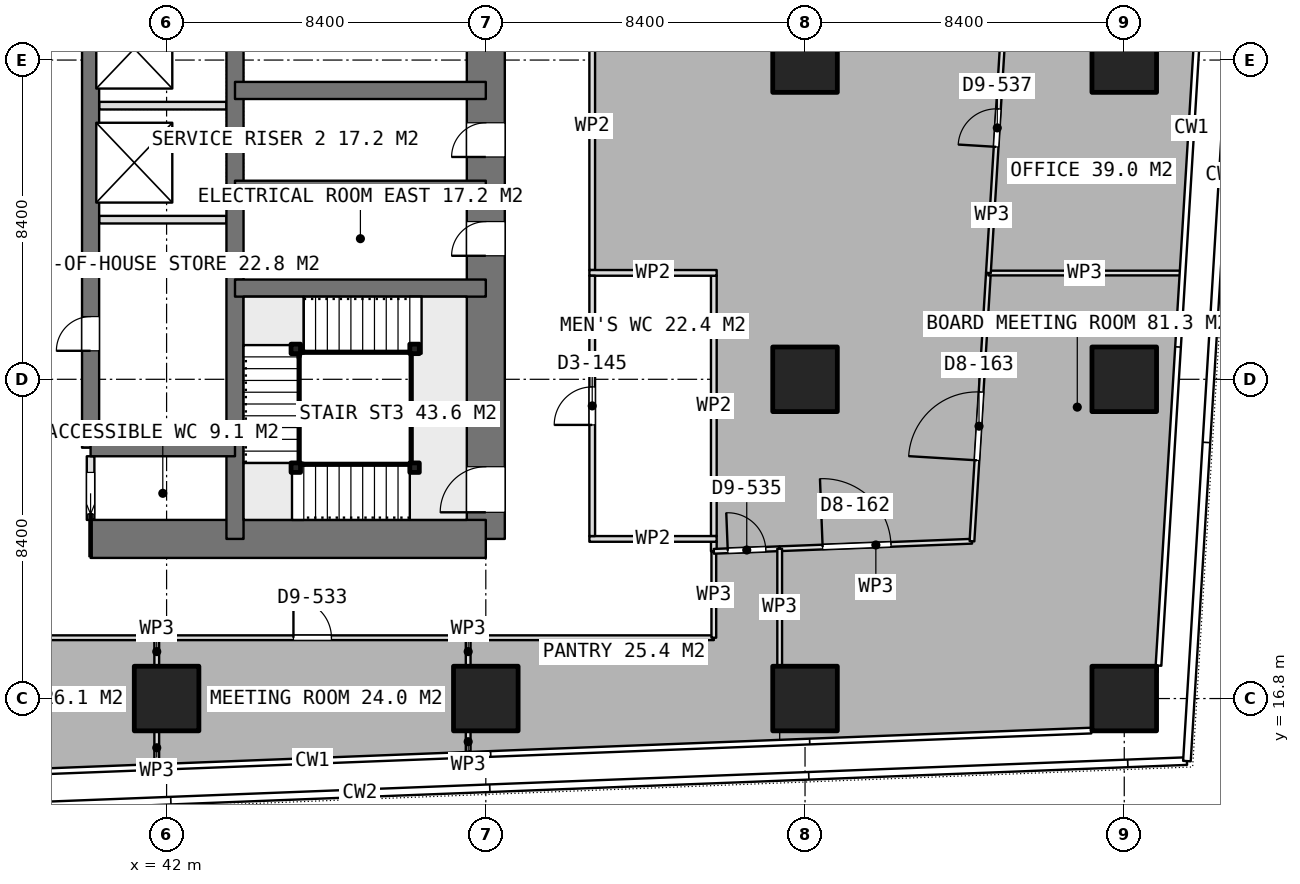
"""IFC4 building model, lengths in metres.
Left out: names, types, materials, properties, quantities, classifications, styles, units other than length and angle.
Written with IfcOpenShell. Run it as: python <this file> out.ifc"""

import sys

from ifc_helpers import new_model, si_unit, direction, frame, frame_2d, origin, origin_2d, place, context, subcontext, project, spatial, rectangle, extrude, element, fill, save


model = new_model("IFC4")
c1 = context("Model", 3, precision=1e-05, world=origin(), true_north=direction((0.0, 1.0)))
c2 = subcontext(c1, "Body", "Model", "MODEL_VIEW")
j1 = project(units=[si_unit("LENGTHUNIT", "METRE"), si_unit("PLANEANGLEUNIT", "RADIAN")], contexts=[c1])
p1 = place(None, origin())
s1 = spatial("IfcSite", under=j1, at=p1, CompositionType="ELEMENT")
p2 = place(p1, origin())
s2 = spatial("IfcBuilding", under=s1, at=p2, CompositionType="ELEMENT")
p3 = place(p2, frame((0.0, 0.0, 136.55)))
s3 = spatial("IfcBuildingStorey", under=s2, at=p3, CompositionType="ELEMENT", Elevation=136.55)
p4 = place(p3, frame((40.0, 21.0, 0.0), z_axis=(0.0, 0.0, 1.0), x_axis=(1.0, 0.0, 0.0)))
e1 = element("IfcWall", 1, at=p4, inside=s3, PredefinedType="SHEAR", context=c2, shape_type="SweptSolid", body=[
    extrude(rectangle(XDim=10.4, YDim=1.0, at=frame_2d((5.2, 0.0))), origin(), (0.0, 0.0, 1.0), 3.75),
])
p5 = place(p3, frame((50.4, 21.0, 0.0), z_axis=(0.0, 0.0, 1.0), x_axis=(0.0, 1.0, 0.0)))
e2 = element("IfcWall", 2, at=p5, inside=s3, PredefinedType="SHEAR", context=c2, shape_type="SweptSolid", body=[
    extrude(rectangle(XDim=25.2, YDim=1.0, at=frame_2d((12.6, 0.0))), origin(), (0.0, 0.0, 1.0), 3.75),
])
p6 = place(p5, frame((16.2, 0.0, 0.0)))
e3 = element("IfcOpeningElement", 3, at=p6, cuts=e2, PredefinedType="OPENING", context=c2, shape_type="SweptSolid", body=[
    extrude(rectangle(XDim=1.2, YDim=2.1, at=frame_2d((0.6, 1.05))), frame((0.0, 0.51, 0.0), z_axis=(0.0, -1.0, 0.0), x_axis=(1.0, 0.0, 0.0)), (0.0, 0.0, 1.0), 1.02),
])
p7 = place(p5, frame((10.05, 0.0, 0.0)))
e4 = element("IfcOpeningElement", 4, at=p7, cuts=e2, PredefinedType="OPENING", context=c2, shape_type="SweptSolid", body=[
    extrude(rectangle(XDim=0.9, YDim=2.1, at=frame_2d((0.45, 1.05))), frame((0.0, 0.51, 0.0), z_axis=(0.0, -1.0, 0.0), x_axis=(1.0, 0.0, 0.0)), (0.0, 0.0, 1.0), 1.02),
])
p8 = place(p5, frame((7.45, 0.0, 0.0)))
e5 = element("IfcOpeningElement", 5, at=p8, cuts=e2, PredefinedType="OPENING", context=c2, shape_type="SweptSolid", body=[
    extrude(rectangle(XDim=0.9, YDim=2.1, at=frame_2d((0.45, 1.05))), frame((0.0, 0.51, 0.0), z_axis=(0.0, -1.0, 0.0), x_axis=(1.0, 0.0, 0.0)), (0.0, 0.0, 1.0), 1.02),
])
p9 = place(p5, frame((0.7, 0.0, 0.0)))
e6 = element("IfcOpeningElement", 6, at=p9, cuts=e2, PredefinedType="OPENING", context=c2, shape_type="SweptSolid", body=[
    extrude(rectangle(XDim=1.2, YDim=2.1, at=frame_2d((0.6, 1.05))), frame((0.0, 0.51, 0.0), z_axis=(0.0, -1.0, 0.0), x_axis=(1.0, 0.0, 0.0)), (0.0, 0.0, 1.0), 1.02),
])
p10 = place(p3, frame((43.8, 21.0, 0.0), z_axis=(0.0, 0.0, 1.0), x_axis=(0.0, 1.0, 0.0)))
e7 = element("IfcWall", 7, at=p10, inside=s3, PredefinedType="SHEAR", context=c2, shape_type="SweptSolid", body=[
    extrude(rectangle(XDim=25.2, YDim=0.45, at=frame_2d((12.6, 0.0))), origin(), (0.0, 0.0, 1.0), 3.75),
])
p11 = place(p3, frame((40.0, 23.4, 0.0), z_axis=(0.0, 0.0, 1.0), x_axis=(0.0, 1.0, 0.0)))
e8 = element("IfcWall", 8, at=p11, inside=s3, PredefinedType="SHEAR", context=c2, shape_type="SweptSolid", body=[
    extrude(rectangle(XDim=18.0, YDim=0.45, at=frame_2d((9.0, 0.0))), origin(), (0.0, 0.0, 1.0), 3.75),
])
p12 = place(p11, frame((2.55, 0.0, 0.0)))
e9 = element("IfcOpeningElement", 9, at=p12, cuts=e8, PredefinedType="OPENING", context=c2, shape_type="SweptSolid", body=[
    extrude(rectangle(XDim=0.9, YDim=2.1, at=frame_2d((0.45, 1.05))), frame((0.0, 0.235, 0.0), z_axis=(0.0, -1.0, 0.0), x_axis=(1.0, 0.0, 0.0)), (0.0, 0.0, 1.0), 0.47),
])
p13 = place(p3, frame((40.0, 23.4, 0.0), z_axis=(0.0, 0.0, 1.0), x_axis=(1.0, 0.0, 0.0)))
e10 = element("IfcWall", 10, at=p13, inside=s3, PredefinedType="SHEAR", context=c2, shape_type="SweptSolid", body=[
    extrude(rectangle(XDim=3.8, YDim=0.45, at=frame_2d((1.9, 0.0))), origin(), (0.0, 0.0, 1.0), 3.75),
])
for number, where, z_axis, x_axis in (
    (11, (43.8, 27.6, 0.0), (0.0, 0.0, 1.0), (1.0, 0.0, 0.0)),
    (12, (43.8, 30.2, 0.0), (0.0, 0.0, 1.0), (1.0, 0.0, 0.0)),
    (13, (43.8, 32.8, 0.0), (0.0, 0.0, 1.0), (1.0, 0.0, 0.0)),
):
    element("IfcWall", number, at=place(p3, frame(where, z_axis=z_axis, x_axis=x_axis)), inside=s3, PredefinedType="SHEAR", context=c2, shape_type="SweptSolid", body=[
        extrude(rectangle(XDim=6.6, YDim=0.45, at=frame_2d((3.3, 0.0))), origin(), (0.0, 0.0, 1.0), 3.75),
    ])
for number, where, z_axis, x_axis in (
    (14, (42.0, 16.8, 0.0), (0.0, 0.0, 1.0), (1.0, 0.0, 0.0)),
    (15, (50.4, 16.8, 0.0), (0.0, 0.0, 1.0), (1.0, 0.0, 0.0)),
    (16, (58.8, 16.8, 0.0), (0.0, 0.0, 1.0), (1.0, 0.0, 0.0)),
    (17, (58.8, 25.2, 0.0), (0.0, 0.0, 1.0), (1.0, 0.0, 0.0)),
    (18, (58.8, 33.6, 0.0), (0.0, 0.0, 1.0), (1.0, 0.0, 0.0)),
    (19, (67.2, 16.8, 0.0), (0.0, 0.0, 1.0), (1.0, 0.0, 0.0)),
    (20, (67.2, 25.2, 0.0), (0.0, 0.0, 1.0), (1.0, 0.0, 0.0)),
    (21, (67.2, 33.6, 0.0), (0.0, 0.0, 1.0), (1.0, 0.0, 0.0)),
):
    element("IfcColumn", number, at=place(p3, frame(where, z_axis=z_axis, x_axis=x_axis)), inside=s3, PredefinedType="COLUMN", context=c2, shape_type="SweptSolid", body=[
        extrude(rectangle(XDim=1.7, YDim=1.7, at=origin_2d()), origin(), (0.0, 0.0, 1.0), 3.75),
    ])
for number, where, z_axis, x_axis in (
    (22, (40.225, 29.4, 0.0), (0.0, 0.0, 1.0), (1.0, 0.0, 0.0)),
    (23, (40.225, 32.4, 0.0), (0.0, 0.0, 1.0), (1.0, 0.0, 0.0)),
):
    element("IfcWall", number, at=place(p3, frame(where, z_axis=z_axis, x_axis=x_axis)), inside=s3, PredefinedType="PARTITIONING", context=c2, shape_type="SweptSolid", body=[
        extrude(rectangle(XDim=3.35, YDim=0.2, at=frame_2d((1.675, 0.0))), origin(), (0.0, 0.0, 1.0), 3.5),
    ])
p14 = place(p3, frame((40.0, 21.5, 0.0), z_axis=(0.0, 0.0, 1.0), x_axis=(0.0, 1.0, 0.0)))
e24 = element("IfcWall", 24, at=p14, inside=s3, PredefinedType="PARTITIONING", context=c2, shape_type="SweptSolid", body=[
    extrude(rectangle(XDim=1.675, YDim=0.2, at=frame_2d((0.837, 0.0))), origin(), (0.0, 0.0, 1.0), 3.5),
])
p15 = place(p14, frame((0.15, 0.0, 0.0)))
e25 = element("IfcOpeningElement", 25, at=p15, cuts=e24, PredefinedType="OPENING", context=c2, shape_type="SweptSolid", body=[
    extrude(rectangle(XDim=1.1, YDim=2.1, at=frame_2d((0.55, 1.05))), frame((0.0, 0.11, 0.0), z_axis=(0.0, -1.0, 0.0), x_axis=(1.0, 0.0, 0.0)), (0.0, 0.0, 1.0), 0.22),
])
for number, where, z_axis, x_axis in (
    (26, (53.125, 21.0, 0.0), (0.0, 0.0, 1.0), (1.0, 0.0, 0.0)),
    (27, (53.125, 28.0, 0.0), (0.0, 0.0, 1.0), (1.0, 0.0, 0.0)),
):
    element("IfcWall", number, at=place(p3, frame(where, z_axis=z_axis, x_axis=x_axis)), inside=s3, PredefinedType="PARTITIONING", context=c2, shape_type="SweptSolid", body=[
        extrude(rectangle(XDim=3.35, YDim=0.15, at=frame_2d((1.675, 0.0))), origin(), (0.0, 0.0, 1.0), 3.5),
    ])
p16 = place(p3, frame((53.2, 21.075, 0.0), z_axis=(0.0, 0.0, 1.0), x_axis=(0.0, 1.0, 0.0)))
e28 = element("IfcWall", 28, at=p16, inside=s3, PredefinedType="PARTITIONING", context=c2, shape_type="SweptSolid", body=[
    extrude(rectangle(XDim=6.85, YDim=0.15, at=frame_2d((3.425, 0.0))), origin(), (0.0, 0.0, 1.0), 3.5),
])
p17 = place(p16, frame((2.925, 0.0, 0.0)))
e29 = element("IfcOpeningElement", 29, at=p17, cuts=e28, PredefinedType="OPENING", context=c2, shape_type="SweptSolid", body=[
    extrude(rectangle(XDim=1.0, YDim=2.1, at=frame_2d((0.5, 1.05))), frame((0.0, 0.085, 0.0), z_axis=(0.0, -1.0, 0.0), x_axis=(1.0, 0.0, 0.0)), (0.0, 0.0, 1.0), 0.17),
])
p18 = place(p3, frame((56.4, 21.075, 0.0), z_axis=(0.0, 0.0, 1.0), x_axis=(0.0, 1.0, 0.0)))
e30 = element("IfcWall", 30, at=p18, inside=s3, PredefinedType="PARTITIONING", context=c2, shape_type="SweptSolid", body=[
    extrude(rectangle(XDim=6.85, YDim=0.15, at=frame_2d((3.425, 0.0))), origin(), (0.0, 0.0, 1.0), 3.5),
])
p19 = place(p3, frame((41.741, 18.4, 0.0), z_axis=(0.0, 0.0, 1.0), x_axis=(1.0, 0.0, 0.0)))
e31 = element("IfcWall", 31, at=p19, inside=s3, PredefinedType="PARTITIONING", context=c2, shape_type="SweptSolid", body=[
    extrude(rectangle(XDim=8.195, YDim=0.125, at=frame_2d((4.098, 0.0))), origin(), (0.0, 0.0, 1.0), 3.5),
])
p20 = place(p19, frame((3.597, 0.0, 0.0)))
e32 = element("IfcOpeningElement", 32, at=p20, cuts=e31, PredefinedType="OPENING", context=c2, shape_type="SweptSolid", body=[
    extrude(rectangle(XDim=1.0, YDim=2.1, at=frame_2d((0.5, 1.05))), frame((0.0, 0.073, 0.0), z_axis=(0.0, -1.0, 0.0), x_axis=(1.0, 0.0, 0.0)), (0.0, 0.0, 1.0), 0.145),
])
p21 = place(p3, frame((49.936, 18.4, 0.0), z_axis=(0.0, 0.0, 1.0), x_axis=(0.0, -1.0, 0.0)))
e33 = element("IfcWall", 33, at=p21, inside=s3, PredefinedType="PARTITIONING", context=c2, shape_type="SweptSolid", body=[
    extrude(rectangle(XDim=0.73, YDim=0.125, at=frame_2d((0.365, 0.0))), origin(), (0.0, 0.0, 1.0), 3.5),
])
p22 = place(p3, frame((49.936, 15.93, 0.0), z_axis=(0.0, 0.0, 1.0), x_axis=(0.0, -1.0, 0.0)))
e34 = element("IfcWall", 34, at=p22, inside=s3, PredefinedType="PARTITIONING", context=c2, shape_type="SweptSolid", body=[
    extrude(rectangle(XDim=0.531, YDim=0.125, at=frame_2d((0.266, 0.0))), origin(), (0.0, 0.0, 1.0), 3.5),
])
p23 = place(p3, frame((41.741, 15.08, 0.0), z_axis=(0.0, 0.0, 1.0), x_axis=(0.0, 1.0, 0.0)))
e35 = element("IfcWall", 35, at=p23, inside=s3, PredefinedType="PARTITIONING", context=c2, shape_type="SweptSolid", body=[
    extrude(rectangle(XDim=0.85, YDim=0.125, at=frame_2d((0.425, 0.0))), origin(), (0.0, 0.0, 1.0), 3.5),
])
p24 = place(p3, frame((41.741, 17.67, 0.0), z_axis=(0.0, 0.0, 1.0), x_axis=(0.0, 1.0, 0.0)))
e36 = element("IfcWall", 36, at=p24, inside=s3, PredefinedType="PARTITIONING", context=c2, shape_type="SweptSolid", body=[
    extrude(rectangle(XDim=0.73, YDim=0.125, at=frame_2d((0.365, 0.0))), origin(), (0.0, 0.0, 1.0), 3.5),
])
p25 = place(p3, frame((49.937, 18.4, 0.0), z_axis=(0.0, 0.0, 1.0), x_axis=(1.0, 0.0, 0.0)))
e37 = element("IfcWall", 37, at=p25, inside=s3, PredefinedType="PARTITIONING", context=c2, shape_type="SweptSolid", body=[
    extrude(rectangle(XDim=6.463, YDim=0.125, at=frame_2d((3.231, 0.0))), origin(), (0.0, 0.0, 1.0), 3.5),
])
p26 = place(p3, frame((56.4, 18.4, 0.0), z_axis=(0.0, 0.0, 1.0), x_axis=(0.0, 1.0, 0.0)))
e38 = element("IfcWall", 38, at=p26, inside=s3, PredefinedType="PARTITIONING", context=c2, shape_type="SweptSolid", body=[
    extrude(rectangle(XDim=2.274, YDim=0.125, at=frame_2d((1.137, 0.0))), origin(), (0.0, 0.0, 1.0), 3.5),
])
p27 = place(p3, frame((56.4, 20.674, 0.0), z_axis=(0.0, 0.0, 1.0), x_axis=(0.999234110548, 0.039130452561, 0.0)))
e39 = element("IfcWall", 39, at=p27, inside=s3, PredefinedType="PARTITIONING", context=c2, shape_type="SweptSolid", body=[
    extrude(rectangle(XDim=1.734, YDim=0.125, at=frame_2d((0.867, 0.0))), origin(), (0.0, 0.0, 1.0), 3.5),
])
p28 = place(p27, frame((0.367, 0.0, 0.0)))
e40 = element("IfcOpeningElement", 40, at=p28, cuts=e39, PredefinedType="OPENING", context=c2, shape_type="SweptSolid", body=[
    extrude(rectangle(XDim=1.0, YDim=2.1, at=frame_2d((0.5, 1.05))), frame((0.0, 0.073, 0.0), z_axis=(0.0, -1.0, 0.0), x_axis=(1.0, 0.0, 0.0)), (0.0, 0.0, 1.0), 0.145),
])
p29 = place(p3, frame((58.133, 20.742, 0.0), z_axis=(0.0, 0.0, 1.0), x_axis=(0.0, -1.0, 0.0)))
e41 = element("IfcWall", 41, at=p29, inside=s3, PredefinedType="PARTITIONING", context=c2, shape_type="SweptSolid", body=[
    extrude(rectangle(XDim=3.072, YDim=0.125, at=frame_2d((1.536, 0.0))), origin(), (0.0, 0.0, 1.0), 3.5),
])
p30 = place(p3, frame((58.134, 20.742, 0.0), z_axis=(0.0, 0.0, 1.0), x_axis=(0.999242539351, 0.038914618727, 0.0)))
e42 = element("IfcWall", 42, at=p30, inside=s3, PredefinedType="PARTITIONING", context=c2, shape_type="SweptSolid", body=[
    extrude(rectangle(XDim=5.063, YDim=0.125, at=frame_2d((2.531, 0.0))), origin(), (0.0, 0.0, 1.0), 3.5),
])
p31 = place(p30, frame((1.13, 0.0, 0.0)))
e43 = element("IfcOpeningElement", 43, at=p31, cuts=e42, PredefinedType="OPENING", context=c2, shape_type="SweptSolid", body=[
    extrude(rectangle(XDim=1.8, YDim=2.1, at=frame_2d((0.9, 1.05))), frame((0.0, 0.073, 0.0), z_axis=(0.0, -1.0, 0.0), x_axis=(1.0, 0.0, 0.0)), (0.0, 0.0, 1.0), 0.145),
])
p32 = place(p3, frame((63.193, 20.939, 0.0), z_axis=(0.0, 0.0, 1.0), x_axis=(0.061084086736, 0.998132623627, 0.0)))
e44 = element("IfcWall", 44, at=p32, inside=s3, PredefinedType="PARTITIONING", context=c2, shape_type="SweptSolid", body=[
    extrude(rectangle(XDim=7.07, YDim=0.125, at=frame_2d((3.535, 0.0))), origin(), (0.0, 0.0, 1.0), 3.5),
])
p33 = place(p32, frame((2.133, 0.0, 0.0)))
e45 = element("IfcOpeningElement", 45, at=p33, cuts=e44, PredefinedType="OPENING", context=c2, shape_type="SweptSolid", body=[
    extrude(rectangle(XDim=1.8, YDim=2.1, at=frame_2d((0.9, 1.05))), frame((0.0, 0.073, 0.0), z_axis=(0.0, -1.0, 0.0), x_axis=(1.0, 0.0, 0.0)), (0.0, 0.0, 1.0), 0.145),
])
p34 = place(p3, frame((63.625, 27.996, 0.0), z_axis=(0.0, 0.0, 1.0), x_axis=(1.0, 0.0, 0.0)))
e46 = element("IfcWall", 46, at=p34, inside=s3, PredefinedType="PARTITIONING", context=c2, shape_type="SweptSolid", body=[
    extrude(rectangle(XDim=5.059, YDim=0.125, at=frame_2d((2.53, 0.0))), origin(), (0.0, 0.0, 1.0), 3.5),
])
p35 = place(p3, frame((63.625, 27.997, 0.0), z_axis=(0.0, 0.0, 1.0), x_axis=(0.061176245149, 0.998126979412, 0.0)))
e47 = element("IfcWall", 47, at=p35, inside=s3, PredefinedType="PARTITIONING", context=c2, shape_type="SweptSolid", body=[
    extrude(rectangle(XDim=7.65, YDim=0.125, at=frame_2d((3.825, 0.0))), origin(), (0.0, 0.0, 1.0), 3.5),
])
p36 = place(p35, frame((3.325, 0.0, 0.0)))
e48 = element("IfcOpeningElement", 48, at=p36, cuts=e47, PredefinedType="OPENING", context=c2, shape_type="SweptSolid", body=[
    extrude(rectangle(XDim=1.0, YDim=2.1, at=frame_2d((0.5, 1.05))), frame((0.0, 0.073, 0.0), z_axis=(0.0, -1.0, 0.0), x_axis=(1.0, 0.0, 0.0)), (0.0, 0.0, 1.0), 0.145),
])
p37 = place(p3, frame((33.826, 18.4, 0.0), z_axis=(0.0, 0.0, 1.0), x_axis=(1.0, 0.0, 0.0)))
e49 = element("IfcWall", 49, at=p37, inside=s3, PredefinedType="PARTITIONING", context=c2, shape_type="SweptSolid", body=[
    extrude(rectangle(XDim=7.914, YDim=0.125, at=frame_2d((3.957, 0.0))), origin(), (0.0, 0.0, 1.0), 3.5),
])
p38 = place(p37, frame((3.457, 0.0, 0.0)))
e50 = element("IfcOpeningElement", 50, at=p38, cuts=e49, PredefinedType="OPENING", context=c2, shape_type="SweptSolid", body=[
    extrude(rectangle(XDim=1.0, YDim=2.1, at=frame_2d((0.5, 1.05))), frame((0.0, 0.073, 0.0), z_axis=(0.0, -1.0, 0.0), x_axis=(1.0, 0.0, 0.0)), (0.0, 0.0, 1.0), 0.145),
])
p39 = place(p3, frame((56.4, 20.674, 0.0), z_axis=(0.0, 0.0, 1.0), x_axis=(0.0, 1.0, 0.0)))
e51 = element("IfcWall", 51, at=p39, inside=s3, PredefinedType="PARTITIONING", context=c2, shape_type="SweptSolid", body=[
    extrude(rectangle(XDim=0.251, YDim=0.15, at=frame_2d((0.125, 0.0))), origin(), (0.0, 0.0, 1.0), 3.5),
])
p40 = place(p3, frame((53.2, 28.075, 0.0), z_axis=(0.0, 0.0, 1.0), x_axis=(0.0, 1.0, 0.0)))
e52 = element("IfcWall", 52, at=p40, inside=s3, PredefinedType="PARTITIONING", context=c2, shape_type="SweptSolid", body=[
    extrude(rectangle(XDim=7.562, YDim=0.15, at=frame_2d((3.781, 0.0))), origin(), (0.0, 0.0, 1.0), 3.5),
])
for number, where, z_axis, x_axis in (
    (53, (48.525, 22.875, 0.0), (0.0, 0.0, 1.0), (1.0, 0.0, 0.0)),
    (54, (45.4, 22.875, 0.0), (0.0, 0.0, 1.0), (1.0, 0.0, 0.0)),
    (55, (45.4, 26.0, 0.0), (0.0, 0.0, 1.0), (1.0, 0.0, 0.0)),
    (56, (48.525, 26.0, 0.0), (0.0, 0.0, 1.0), (1.0, 0.0, 0.0)),
):
    element("IfcColumn", number, at=place(p3, frame(where, z_axis=z_axis, x_axis=x_axis)), inside=s3, PredefinedType="COLUMN", context=c2, shape_type="SweptSolid", body=[
        extrude(rectangle(XDim=0.25, YDim=0.25, at=origin_2d()), origin(), (0.0, 0.0, 1.0), 3.75),
    ])
p41 = place(p7, origin())
e57 = element("IfcDoor", 57, at=p41, inside=s3, OperationType="SINGLE_SWING_LEFT", PredefinedType="DOOR", context=c2, shape_type="SweptSolid", body=[
    extrude(rectangle(XDim=0.9, YDim=2.1, at=frame_2d((0.45, 1.05))), frame((0.0, 0.025, 0.0), z_axis=(0.0, -1.0, 0.0), x_axis=(1.0, 0.0, 0.0)), (0.0, 0.0, 1.0), 0.05),
])
fill(e4, e57)
p42 = place(p8, origin())
e58 = element("IfcDoor", 58, at=p42, inside=s3, OperationType="SINGLE_SWING_LEFT", PredefinedType="DOOR", context=c2, shape_type="SweptSolid", body=[
    extrude(rectangle(XDim=0.9, YDim=2.1, at=frame_2d((0.45, 1.05))), frame((0.0, 0.025, 0.0), z_axis=(0.0, -1.0, 0.0), x_axis=(1.0, 0.0, 0.0)), (0.0, 0.0, 1.0), 0.05),
])
fill(e5, e58)
p43 = place(p15, origin())
e59 = element("IfcDoor", 59, at=p43, inside=s3, OperationType="SLIDING_TO_LEFT", PredefinedType="DOOR", context=c2, shape_type="SweptSolid", body=[
    extrude(rectangle(XDim=1.1, YDim=2.1, at=frame_2d((0.55, 1.05))), frame((0.0, 0.025, 0.0), z_axis=(0.0, -1.0, 0.0), x_axis=(1.0, 0.0, 0.0)), (0.0, 0.0, 1.0), 0.05),
])
fill(e25, e59)
p44 = place(p12, origin())
e60 = element("IfcDoor", 60, at=p44, inside=s3, OperationType="SINGLE_SWING_LEFT", PredefinedType="DOOR", context=c2, shape_type="SweptSolid", body=[
    extrude(rectangle(XDim=0.9, YDim=2.1, at=frame_2d((0.45, 1.05))), frame((0.0, 0.025, 0.0), z_axis=(0.0, -1.0, 0.0), x_axis=(1.0, 0.0, 0.0)), (0.0, 0.0, 1.0), 0.05),
])
fill(e9, e60)
p45 = place(p17, origin())
e61 = element("IfcDoor", 61, at=p45, inside=s3, OperationType="SINGLE_SWING_LEFT", PredefinedType="DOOR", context=c2, shape_type="SweptSolid", body=[
    extrude(rectangle(XDim=1.0, YDim=2.1, at=frame_2d((0.5, 1.05))), frame((0.0, 0.025, 0.0), z_axis=(0.0, -1.0, 0.0), x_axis=(1.0, 0.0, 0.0)), (0.0, 0.0, 1.0), 0.05),
])
fill(e29, e61)
p46 = place(p20, origin())
e62 = element("IfcDoor", 62, at=p46, inside=s3, OperationType="SINGLE_SWING_LEFT", PredefinedType="DOOR", context=c2, shape_type="SweptSolid", body=[
    extrude(rectangle(XDim=1.0, YDim=2.1, at=frame_2d((0.5, 1.05))), frame((0.0, 0.025, 0.0), z_axis=(0.0, -1.0, 0.0), x_axis=(1.0, 0.0, 0.0)), (0.0, 0.0, 1.0), 0.05),
])
fill(e32, e62)
p47 = place(p28, origin())
e63 = element("IfcDoor", 63, at=p47, inside=s3, OperationType="SINGLE_SWING_LEFT", PredefinedType="DOOR", context=c2, shape_type="SweptSolid", body=[
    extrude(rectangle(XDim=1.0, YDim=2.1, at=frame_2d((0.5, 1.05))), frame((0.0, 0.025, 0.0), z_axis=(0.0, -1.0, 0.0), x_axis=(1.0, 0.0, 0.0)), (0.0, 0.0, 1.0), 0.05),
])
fill(e40, e63)
p48 = place(p33, origin())
e64 = element("IfcDoor", 64, at=p48, inside=s3, OperationType="DOUBLE_DOOR_SINGLE_SWING", PredefinedType="DOOR", context=c2, shape_type="SweptSolid", body=[
    extrude(rectangle(XDim=1.8, YDim=2.1, at=frame_2d((0.9, 1.05))), frame((0.0, 0.025, 0.0), z_axis=(0.0, -1.0, 0.0), x_axis=(1.0, 0.0, 0.0)), (0.0, 0.0, 1.0), 0.05),
])
fill(e45, e64)
p49 = place(p31, origin())
e65 = element("IfcDoor", 65, at=p49, inside=s3, OperationType="DOUBLE_DOOR_SINGLE_SWING", PredefinedType="DOOR", context=c2, shape_type="SweptSolid", body=[
    extrude(rectangle(XDim=1.8, YDim=2.1, at=frame_2d((0.9, 1.05))), frame((0.0, 0.025, 0.0), z_axis=(0.0, -1.0, 0.0), x_axis=(1.0, 0.0, 0.0)), (0.0, 0.0, 1.0), 0.05),
])
fill(e43, e65)
p50 = place(p36, origin())
e66 = element("IfcDoor", 66, at=p50, inside=s3, OperationType="SINGLE_SWING_LEFT", PredefinedType="DOOR", context=c2, shape_type="SweptSolid", body=[
    extrude(rectangle(XDim=1.0, YDim=2.1, at=frame_2d((0.5, 1.05))), frame((0.0, 0.025, 0.0), z_axis=(0.0, -1.0, 0.0), x_axis=(1.0, 0.0, 0.0)), (0.0, 0.0, 1.0), 0.05),
])
fill(e48, e66)
p51 = place(p9, origin())
e67 = element("IfcDoor", 67, at=p51, inside=s3, OperationType="SINGLE_SWING_RIGHT", PredefinedType="DOOR", context=c2, shape_type="SweptSolid", body=[
    extrude(rectangle(XDim=1.2, YDim=2.1, at=frame_2d((0.6, 1.05))), frame((0.0, 0.025, 0.0), z_axis=(0.0, -1.0, 0.0), x_axis=(1.0, 0.0, 0.0)), (0.0, 0.0, 1.0), 0.05),
])
fill(e6, e67)
save(model, sys.argv[1])
